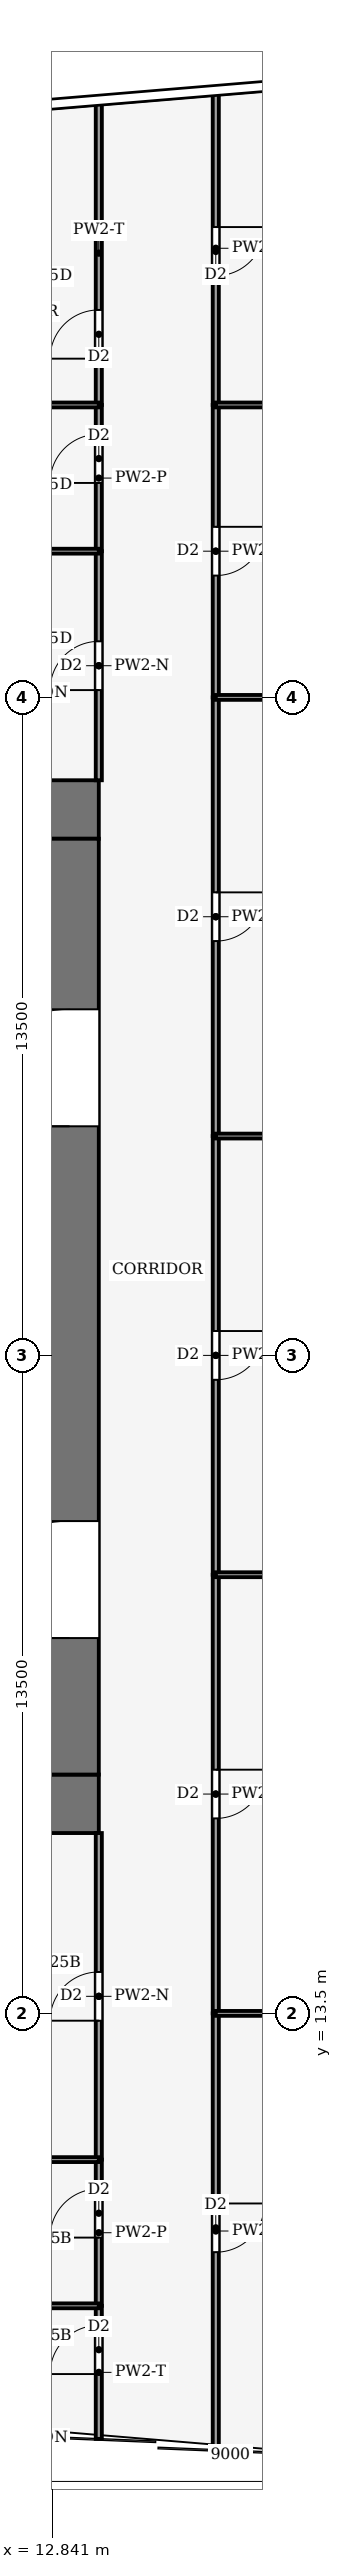
"""IFC4 building model, lengths in metres.
Left out: names, types, materials, properties, quantities, classifications, styles, units other than length and angle.
Written with IfcOpenShell. Run it as: python <this file> out.ifc"""

import sys

from ifc_helpers import new_model, si_unit, direction, frame, frame_2d, origin, place, context, subcontext, project, spatial, rectangle, extrude, element, fill, save


model = new_model("IFC4")
c1 = context("Model", 3, precision=1e-05, world=origin(), true_north=direction((0.0, 1.0)))
c2 = subcontext(c1, "Body", "Model", "MODEL_VIEW")
j1 = project(units=[si_unit("LENGTHUNIT", "METRE"), si_unit("PLANEANGLEUNIT", "RADIAN")], contexts=[c1])
p1 = place(None, origin())
s1 = spatial("IfcSite", under=j1, at=p1, CompositionType="ELEMENT")
p2 = place(p1, origin())
s2 = spatial("IfcBuilding", under=s1, at=p2, CompositionType="ELEMENT")
p3 = place(p2, frame((0.0, 0.0, 110.0)))
s3 = spatial("IfcBuildingStorey", under=s2, at=p3, CompositionType="ELEMENT", Elevation=110.0)
for number, where, z_axis, x_axis in (
    (1, (-13.8, 17.8, -0.13), (0.0, 0.0, 1.0), (1.0, 0.0, 0.0)),
    (2, (-13.8, 38.2, -0.13), (0.0, 0.0, 1.0), (1.0, 0.0, 0.0)),
):
    element("IfcWall", number, at=place(p3, frame(where, z_axis=z_axis, x_axis=x_axis)), inside=s3, PredefinedType="SHEAR", context=c2, shape_type="SweptSolid", body=[
        extrude(rectangle(XDim=27.6, YDim=1.2, at=frame_2d((13.8, 0.0))), origin(), (0.0, 0.0, 1.0), 3.88),
    ])
p4 = place(p3, frame((13.2, 18.4, -0.13), z_axis=(0.0, 0.0, 1.0), x_axis=(0.0, 1.0, 0.0)))
e3 = element("IfcWall", 3, at=p4, inside=s3, PredefinedType="SHEAR", context=c2, shape_type="SweptSolid", body=[
    extrude(rectangle(XDim=19.2, YDim=1.2, at=frame_2d((9.6, 0.0))), origin(), (0.0, 0.0, 1.0), 3.88),
])
p5 = place(p4, frame((2.8, 0.0, 0.13)))
e4 = element("IfcOpeningElement", 4, at=p5, cuts=e3, PredefinedType="OPENING", context=c2, shape_type="SweptSolid", body=[
    extrude(rectangle(XDim=2.4, YDim=2.4, at=frame_2d((1.2, 1.2))), frame((0.0, 0.61, 0.0), z_axis=(0.0, -1.0, 0.0), x_axis=(1.0, 0.0, 0.0)), (0.0, 0.0, 1.0), 1.22),
])
p6 = place(p4, frame((13.3, 0.0, 0.13)))
e5 = element("IfcOpeningElement", 5, at=p6, cuts=e3, PredefinedType="OPENING", context=c2, shape_type="SweptSolid", body=[
    extrude(rectangle(XDim=2.4, YDim=2.4, at=frame_2d((1.2, 1.2))), frame((0.0, 0.61, 0.0), z_axis=(0.0, -1.0, 0.0), x_axis=(1.0, 0.0, 0.0)), (0.0, 0.0, 1.0), 1.22),
])
p7 = place(p3, frame((16.2, 13.5, 0.0), z_axis=(0.0, 0.0, 1.0), x_axis=(0.0, -1.0, 0.0)))
e6 = element("IfcWall", 6, at=p7, inside=s3, PredefinedType="PARTITIONING", context=c2, shape_type="SweptSolid", body=[
    extrude(rectangle(XDim=8.93, YDim=0.125, at=frame_2d((4.465, 0.0))), origin(), (0.0, 0.0, 1.0), 2.92),
])
p8 = place(p7, frame((3.9, 0.0, 0.0)))
e7 = element("IfcOpeningElement", 7, at=p8, cuts=e6, PredefinedType="OPENING", context=c2, shape_type="SweptSolid", body=[
    extrude(rectangle(XDim=1.0, YDim=2.1, at=frame_2d((0.5, 1.05))), frame((0.0, 0.073, 0.0), z_axis=(0.0, -1.0, 0.0), x_axis=(1.0, 0.0, 0.0)), (0.0, 0.0, 1.0), 0.145),
])
p9 = place(p3, frame((16.2, 22.5, 0.0), z_axis=(0.0, 0.0, 1.0), x_axis=(0.0, -1.0, 0.0)))
e8 = element("IfcWall", 8, at=p9, inside=s3, PredefinedType="PARTITIONING", context=c2, shape_type="SweptSolid", body=[
    extrude(rectangle(XDim=9.0, YDim=0.125, at=frame_2d((4.5, 0.0))), origin(), (0.0, 0.0, 1.0), 3.02),
])
p10 = place(p9, frame((4.0, 0.0, 0.0)))
e9 = element("IfcOpeningElement", 9, at=p10, cuts=e8, PredefinedType="OPENING", context=c2, shape_type="SweptSolid", body=[
    extrude(rectangle(XDim=1.0, YDim=2.1, at=frame_2d((0.5, 1.05))), frame((0.0, 0.073, 0.0), z_axis=(0.0, -1.0, 0.0), x_axis=(1.0, 0.0, 0.0)), (0.0, 0.0, 1.0), 0.145),
])
p11 = place(p3, frame((16.2, 31.5, 0.0), z_axis=(0.0, 0.0, 1.0), x_axis=(0.0, -1.0, 0.0)))
e10 = element("IfcWall", 10, at=p11, inside=s3, PredefinedType="PARTITIONING", context=c2, shape_type="SweptSolid", body=[
    extrude(rectangle(XDim=9.0, YDim=0.125, at=frame_2d((4.5, 0.0))), origin(), (0.0, 0.0, 1.0), 3.36),
])
p12 = place(p11, frame((4.0, 0.0, 0.0)))
e11 = element("IfcOpeningElement", 11, at=p12, cuts=e10, PredefinedType="OPENING", context=c2, shape_type="SweptSolid", body=[
    extrude(rectangle(XDim=1.0, YDim=2.1, at=frame_2d((0.5, 1.05))), frame((0.0, 0.073, 0.0), z_axis=(0.0, -1.0, 0.0), x_axis=(1.0, 0.0, 0.0)), (0.0, 0.0, 1.0), 0.145),
])
p13 = place(p3, frame((16.2, 40.5, 0.0), z_axis=(0.0, 0.0, 1.0), x_axis=(0.0, -1.0, 0.0)))
e12 = element("IfcWall", 12, at=p13, inside=s3, PredefinedType="PARTITIONING", context=c2, shape_type="SweptSolid", body=[
    extrude(rectangle(XDim=9.0, YDim=0.125, at=frame_2d((4.5, 0.0))), origin(), (0.0, 0.0, 1.0), 3.02),
])
p14 = place(p13, frame((4.0, 0.0, 0.0)))
e13 = element("IfcOpeningElement", 13, at=p14, cuts=e12, PredefinedType="OPENING", context=c2, shape_type="SweptSolid", body=[
    extrude(rectangle(XDim=1.0, YDim=2.1, at=frame_2d((0.5, 1.05))), frame((0.0, 0.073, 0.0), z_axis=(0.0, -1.0, 0.0), x_axis=(1.0, 0.0, 0.0)), (0.0, 0.0, 1.0), 0.145),
])
p15 = place(p3, frame((16.2, 46.5, 0.0), z_axis=(0.0, 0.0, 1.0), x_axis=(0.0, -1.0, 0.0)))
e14 = element("IfcWall", 14, at=p15, inside=s3, PredefinedType="PARTITIONING", context=c2, shape_type="SweptSolid", body=[
    extrude(rectangle(XDim=6.0, YDim=0.125, at=frame_2d((3.0, 0.0))), origin(), (0.0, 0.0, 1.0), 3.75),
])
p16 = place(p15, frame((2.5, 0.0, 0.0)))
e15 = element("IfcOpeningElement", 15, at=p16, cuts=e14, PredefinedType="OPENING", context=c2, shape_type="SweptSolid", body=[
    extrude(rectangle(XDim=1.0, YDim=2.1, at=frame_2d((0.5, 1.05))), frame((0.0, 0.073, 0.0), z_axis=(0.0, -1.0, 0.0), x_axis=(1.0, 0.0, 0.0)), (0.0, 0.0, 1.0), 0.145),
])
p17 = place(p3, frame((16.2, 52.93, 0.0), z_axis=(0.0, 0.0, 1.0), x_axis=(0.0, -1.0, 0.0)))
e16 = element("IfcWall", 16, at=p17, inside=s3, PredefinedType="PARTITIONING", context=c2, shape_type="SweptSolid", body=[
    extrude(rectangle(XDim=6.43, YDim=0.125, at=frame_2d((3.215, 0.0))), origin(), (0.0, 0.0, 1.0), 2.92),
])
p18 = place(p17, frame((2.78, 0.0, 0.0)))
e17 = element("IfcOpeningElement", 17, at=p18, cuts=e16, PredefinedType="OPENING", context=c2, shape_type="SweptSolid", body=[
    extrude(rectangle(XDim=1.0, YDim=2.1, at=frame_2d((0.5, 1.05))), frame((0.0, 0.073, 0.0), z_axis=(0.0, -1.0, 0.0), x_axis=(1.0, 0.0, 0.0)), (0.0, 0.0, 1.0), 0.145),
])
p19 = place(p3, frame((13.8, 4.77, 0.0), z_axis=(0.0, 0.0, 1.0), x_axis=(0.0, 1.0, 0.0)))
e18 = element("IfcWall", 18, at=p19, inside=s3, PredefinedType="PARTITIONING", context=c2, shape_type="SweptSolid", body=[
    extrude(rectangle(XDim=2.73, YDim=0.125, at=frame_2d((1.365, 0.0))), origin(), (0.0, 0.0, 1.0), 2.92),
])
p20 = place(p19, frame((1.33, 0.0, 0.0)))
e19 = element("IfcOpeningElement", 19, at=p20, cuts=e18, PredefinedType="OPENING", context=c2, shape_type="SweptSolid", body=[
    extrude(rectangle(XDim=1.0, YDim=2.1, at=frame_2d((0.5, 1.05))), frame((0.0, 0.073, 0.0), z_axis=(0.0, -1.0, 0.0), x_axis=(1.0, 0.0, 0.0)), (0.0, 0.0, 1.0), 0.145),
])
p21 = place(p3, frame((13.8, 7.5, 0.0), z_axis=(0.0, 0.0, 1.0), x_axis=(0.0, 1.0, 0.0)))
e20 = element("IfcWall", 20, at=p21, inside=s3, PredefinedType="PARTITIONING", context=c2, shape_type="SweptSolid", body=[
    extrude(rectangle(XDim=3.0, YDim=0.125, at=frame_2d((1.5, 0.0))), origin(), (0.0, 0.0, 1.0), 3.75),
])
p22 = place(p21, frame((1.4, 0.0, 0.0)))
e21 = element("IfcOpeningElement", 21, at=p22, cuts=e20, PredefinedType="OPENING", context=c2, shape_type="SweptSolid", body=[
    extrude(rectangle(XDim=1.0, YDim=2.1, at=frame_2d((0.5, 1.05))), frame((0.0, 0.073, 0.0), z_axis=(0.0, -1.0, 0.0), x_axis=(1.0, 0.0, 0.0)), (0.0, 0.0, 1.0), 0.145),
])
p23 = place(p3, frame((13.8, 10.5, 0.0), z_axis=(0.0, 0.0, 1.0), x_axis=(0.0, 1.0, 0.0)))
e22 = element("IfcWall", 22, at=p23, inside=s3, PredefinedType="PARTITIONING", context=c2, shape_type="SweptSolid", body=[
    extrude(rectangle(XDim=6.7, YDim=0.125, at=frame_2d((3.35, 0.0))), origin(), (0.0, 0.0, 1.0), 3.02),
])
p24 = place(p23, frame((2.85, 0.0, 0.0)))
e23 = element("IfcOpeningElement", 23, at=p24, cuts=e22, PredefinedType="OPENING", context=c2, shape_type="SweptSolid", body=[
    extrude(rectangle(XDim=1.0, YDim=2.1, at=frame_2d((0.5, 1.05))), frame((0.0, 0.073, 0.0), z_axis=(0.0, -1.0, 0.0), x_axis=(1.0, 0.0, 0.0)), (0.0, 0.0, 1.0), 0.145),
])
p25 = place(p3, frame((13.8, 38.8, 0.0), z_axis=(0.0, 0.0, 1.0), x_axis=(0.0, 1.0, 0.0)))
e24 = element("IfcWall", 24, at=p25, inside=s3, PredefinedType="PARTITIONING", context=c2, shape_type="SweptSolid", body=[
    extrude(rectangle(XDim=4.7, YDim=0.125, at=frame_2d((2.35, 0.0))), origin(), (0.0, 0.0, 1.0), 3.02),
])
p26 = place(p25, frame((1.85, 0.0, 0.0)))
e25 = element("IfcOpeningElement", 25, at=p26, cuts=e24, PredefinedType="OPENING", context=c2, shape_type="SweptSolid", body=[
    extrude(rectangle(XDim=1.0, YDim=2.1, at=frame_2d((0.5, 1.05))), frame((0.0, 0.073, 0.0), z_axis=(0.0, -1.0, 0.0), x_axis=(1.0, 0.0, 0.0)), (0.0, 0.0, 1.0), 0.145),
])
p27 = place(p3, frame((13.8, 43.5, 0.0), z_axis=(0.0, 0.0, 1.0), x_axis=(0.0, 1.0, 0.0)))
e26 = element("IfcWall", 26, at=p27, inside=s3, PredefinedType="PARTITIONING", context=c2, shape_type="SweptSolid", body=[
    extrude(rectangle(XDim=3.0, YDim=0.125, at=frame_2d((1.5, 0.0))), origin(), (0.0, 0.0, 1.0), 3.75),
])
p28 = place(p27, frame((1.4, 0.0, 0.0)))
e27 = element("IfcOpeningElement", 27, at=p28, cuts=e26, PredefinedType="OPENING", context=c2, shape_type="SweptSolid", body=[
    extrude(rectangle(XDim=1.0, YDim=2.1, at=frame_2d((0.5, 1.05))), frame((0.0, 0.073, 0.0), z_axis=(0.0, -1.0, 0.0), x_axis=(1.0, 0.0, 0.0)), (0.0, 0.0, 1.0), 0.145),
])
p29 = place(p3, frame((13.8, 46.5, 0.0), z_axis=(0.0, 0.0, 1.0), x_axis=(0.0, 1.0, 0.0)))
e28 = element("IfcWall", 28, at=p29, inside=s3, PredefinedType="PARTITIONING", context=c2, shape_type="SweptSolid", body=[
    extrude(rectangle(XDim=6.23, YDim=0.125, at=frame_2d((3.115, 0.0))), origin(), (0.0, 0.0, 1.0), 2.92),
])
p30 = place(p29, frame((0.95, 0.0, 0.0)))
e29 = element("IfcOpeningElement", 29, at=p30, cuts=e28, PredefinedType="OPENING", context=c2, shape_type="SweptSolid", body=[
    extrude(rectangle(XDim=1.0, YDim=2.1, at=frame_2d((0.5, 1.05))), frame((0.0, 0.073, 0.0), z_axis=(0.0, -1.0, 0.0), x_axis=(1.0, 0.0, 0.0)), (0.0, 0.0, 1.0), 0.145),
])
p31 = place(p3, frame((23.833, 13.5, 0.0), z_axis=(0.0, 0.0, 1.0), x_axis=(-1.0, 0.0, 0.0)))
e30 = element("IfcWall", 30, at=p31, inside=s3, PredefinedType="PARTITIONING", context=c2, shape_type="SweptSolid", body=[
    extrude(rectangle(XDim=7.634, YDim=0.1, at=frame_2d((3.817, 0.0))), origin(), (0.0, 0.0, 1.0), 2.92),
])
p32 = place(p3, frame((23.094, 22.5, 0.0), z_axis=(0.0, 0.0, 1.0), x_axis=(-1.0, 0.0, 0.0)))
e31 = element("IfcWall", 31, at=p32, inside=s3, PredefinedType="PARTITIONING", context=c2, shape_type="SweptSolid", body=[
    extrude(rectangle(XDim=6.894, YDim=0.1, at=frame_2d((3.447, 0.0))), origin(), (0.0, 0.0, 1.0), 2.92),
])
p33 = place(p3, frame((22.806, 31.5, 0.0), z_axis=(0.0, 0.0, 1.0), x_axis=(-1.0, 0.0, 0.0)))
e32 = element("IfcWall", 32, at=p33, inside=s3, PredefinedType="PARTITIONING", context=c2, shape_type="SweptSolid", body=[
    extrude(rectangle(XDim=6.606, YDim=0.1, at=frame_2d((3.303, 0.0))), origin(), (0.0, 0.0, 1.0), 2.92),
])
p34 = place(p3, frame((23.546, 40.5, 0.0), z_axis=(0.0, 0.0, 1.0), x_axis=(-1.0, 0.0, 0.0)))
e33 = element("IfcWall", 33, at=p34, inside=s3, PredefinedType="PARTITIONING", context=c2, shape_type="SweptSolid", body=[
    extrude(rectangle(XDim=7.346, YDim=0.1, at=frame_2d((3.673, 0.0))), origin(), (0.0, 0.0, 1.0), 2.92),
])
p35 = place(p3, frame((24.039, 46.5, 0.0), z_axis=(0.0, 0.0, 1.0), x_axis=(-1.0, 0.0, 0.0)))
e34 = element("IfcWall", 34, at=p35, inside=s3, PredefinedType="PARTITIONING", context=c2, shape_type="SweptSolid", body=[
    extrude(rectangle(XDim=7.839, YDim=0.1, at=frame_2d((3.919, 0.0))), origin(), (0.0, 0.0, 1.0), 2.92),
])
for number, where, z_axis, x_axis in (
    (35, (13.8, 7.5, 0.0), (0.0, 0.0, 1.0), (-1.0, 0.0, 0.0)),
    (36, (13.8, 10.5, 0.0), (0.0, 0.0, 1.0), (-1.0, 0.0, 0.0)),
):
    element("IfcWall", number, at=place(p3, frame(where, z_axis=z_axis, x_axis=x_axis)), inside=s3, PredefinedType="PARTITIONING", context=c2, shape_type="SweptSolid", body=[
        extrude(rectangle(XDim=3.3, YDim=0.1, at=frame_2d((1.65, 0.0))), origin(), (0.0, 0.0, 1.0), 3.32),
    ])
for number, where, z_axis, x_axis in (
    (37, (13.8, 43.5, 0.0), (0.0, 0.0, 1.0), (-1.0, 0.0, 0.0)),
    (38, (13.8, 46.5, 0.0), (0.0, 0.0, 1.0), (-1.0, 0.0, 0.0)),
):
    element("IfcWall", number, at=place(p3, frame(where, z_axis=z_axis, x_axis=x_axis)), inside=s3, PredefinedType="PARTITIONING", context=c2, shape_type="SweptSolid", body=[
        extrude(rectangle(XDim=3.3, YDim=0.1, at=frame_2d((1.65, 0.0))), origin(), (0.0, 0.0, 1.0), 3.27),
    ])
p36 = place(p5, origin())
e39 = element("IfcDoor", 39, at=p36, inside=s3, OperationType="DOUBLE_DOOR_SINGLE_SWING", PredefinedType="DOOR", context=c2, shape_type="SweptSolid", body=[
    extrude(rectangle(XDim=2.4, YDim=2.4, at=frame_2d((1.2, 1.2))), frame((0.0, 0.025, 0.0), z_axis=(0.0, -1.0, 0.0), x_axis=(1.0, 0.0, 0.0)), (0.0, 0.0, 1.0), 0.05),
])
fill(e4, e39)
p37 = place(p6, origin())
e40 = element("IfcDoor", 40, at=p37, inside=s3, OperationType="DOUBLE_DOOR_SINGLE_SWING", PredefinedType="DOOR", context=c2, shape_type="SweptSolid", body=[
    extrude(rectangle(XDim=2.4, YDim=2.4, at=frame_2d((1.2, 1.2))), frame((0.0, 0.025, 0.0), z_axis=(0.0, -1.0, 0.0), x_axis=(1.0, 0.0, 0.0)), (0.0, 0.0, 1.0), 0.05),
])
fill(e5, e40)
p38 = place(p8, origin())
e41 = element("IfcDoor", 41, at=p38, inside=s3, OperationType="SINGLE_SWING_LEFT", PredefinedType="DOOR", context=c2, shape_type="SweptSolid", body=[
    extrude(rectangle(XDim=1.0, YDim=2.1, at=frame_2d((0.5, 1.05))), frame((0.0, 0.025, 0.0), z_axis=(0.0, -1.0, 0.0), x_axis=(1.0, 0.0, 0.0)), (0.0, 0.0, 1.0), 0.05),
])
fill(e7, e41)
p39 = place(p10, origin())
e42 = element("IfcDoor", 42, at=p39, inside=s3, OperationType="SINGLE_SWING_LEFT", PredefinedType="DOOR", context=c2, shape_type="SweptSolid", body=[
    extrude(rectangle(XDim=1.0, YDim=2.1, at=frame_2d((0.5, 1.05))), frame((0.0, 0.025, 0.0), z_axis=(0.0, -1.0, 0.0), x_axis=(1.0, 0.0, 0.0)), (0.0, 0.0, 1.0), 0.05),
])
fill(e9, e42)
p40 = place(p12, origin())
e43 = element("IfcDoor", 43, at=p40, inside=s3, OperationType="SINGLE_SWING_RIGHT", PredefinedType="DOOR", context=c2, shape_type="SweptSolid", body=[
    extrude(rectangle(XDim=1.0, YDim=2.1, at=frame_2d((0.5, 1.05))), frame((0.0, 0.025, 0.0), z_axis=(0.0, -1.0, 0.0), x_axis=(1.0, 0.0, 0.0)), (0.0, 0.0, 1.0), 0.05),
])
fill(e11, e43)
p41 = place(p14, origin())
e44 = element("IfcDoor", 44, at=p41, inside=s3, OperationType="SINGLE_SWING_LEFT", PredefinedType="DOOR", context=c2, shape_type="SweptSolid", body=[
    extrude(rectangle(XDim=1.0, YDim=2.1, at=frame_2d((0.5, 1.05))), frame((0.0, 0.025, 0.0), z_axis=(0.0, -1.0, 0.0), x_axis=(1.0, 0.0, 0.0)), (0.0, 0.0, 1.0), 0.05),
])
fill(e13, e44)
p42 = place(p16, origin())
e45 = element("IfcDoor", 45, at=p42, inside=s3, OperationType="SINGLE_SWING_RIGHT", PredefinedType="DOOR", context=c2, shape_type="SweptSolid", body=[
    extrude(rectangle(XDim=1.0, YDim=2.1, at=frame_2d((0.5, 1.05))), frame((0.0, 0.025, 0.0), z_axis=(0.0, -1.0, 0.0), x_axis=(1.0, 0.0, 0.0)), (0.0, 0.0, 1.0), 0.05),
])
fill(e15, e45)
p43 = place(p18, origin())
e46 = element("IfcDoor", 46, at=p43, inside=s3, OperationType="SINGLE_SWING_RIGHT", PredefinedType="DOOR", context=c2, shape_type="SweptSolid", body=[
    extrude(rectangle(XDim=1.0, YDim=2.1, at=frame_2d((0.5, 1.05))), frame((0.0, 0.025, 0.0), z_axis=(0.0, -1.0, 0.0), x_axis=(1.0, 0.0, 0.0)), (0.0, 0.0, 1.0), 0.05),
])
fill(e17, e46)
p44 = place(p20, origin())
e47 = element("IfcDoor", 47, at=p44, inside=s3, OperationType="SINGLE_SWING_RIGHT", PredefinedType="DOOR", context=c2, shape_type="SweptSolid", body=[
    extrude(rectangle(XDim=1.0, YDim=2.1, at=frame_2d((0.5, 1.05))), frame((0.0, 0.025, 0.0), z_axis=(0.0, -1.0, 0.0), x_axis=(1.0, 0.0, 0.0)), (0.0, 0.0, 1.0), 0.05),
])
fill(e19, e47)
p45 = place(p22, origin())
e48 = element("IfcDoor", 48, at=p45, inside=s3, OperationType="SINGLE_SWING_RIGHT", PredefinedType="DOOR", context=c2, shape_type="SweptSolid", body=[
    extrude(rectangle(XDim=1.0, YDim=2.1, at=frame_2d((0.5, 1.05))), frame((0.0, 0.025, 0.0), z_axis=(0.0, -1.0, 0.0), x_axis=(1.0, 0.0, 0.0)), (0.0, 0.0, 1.0), 0.05),
])
fill(e21, e48)
p46 = place(p24, origin())
e49 = element("IfcDoor", 49, at=p46, inside=s3, OperationType="SINGLE_SWING_RIGHT", PredefinedType="DOOR", context=c2, shape_type="SweptSolid", body=[
    extrude(rectangle(XDim=1.0, YDim=2.1, at=frame_2d((0.5, 1.05))), frame((0.0, 0.025, 0.0), z_axis=(0.0, -1.0, 0.0), x_axis=(1.0, 0.0, 0.0)), (0.0, 0.0, 1.0), 0.05),
])
fill(e23, e49)
p47 = place(p26, origin())
e50 = element("IfcDoor", 50, at=p47, inside=s3, OperationType="SINGLE_SWING_LEFT", PredefinedType="DOOR", context=c2, shape_type="SweptSolid", body=[
    extrude(rectangle(XDim=1.0, YDim=2.1, at=frame_2d((0.5, 1.05))), frame((0.0, 0.025, 0.0), z_axis=(0.0, -1.0, 0.0), x_axis=(1.0, 0.0, 0.0)), (0.0, 0.0, 1.0), 0.05),
])
fill(e25, e50)
p48 = place(p28, origin())
e51 = element("IfcDoor", 51, at=p48, inside=s3, OperationType="SINGLE_SWING_RIGHT", PredefinedType="DOOR", context=c2, shape_type="SweptSolid", body=[
    extrude(rectangle(XDim=1.0, YDim=2.1, at=frame_2d((0.5, 1.05))), frame((0.0, 0.025, 0.0), z_axis=(0.0, -1.0, 0.0), x_axis=(1.0, 0.0, 0.0)), (0.0, 0.0, 1.0), 0.05),
])
fill(e27, e51)
p49 = place(p30, origin())
e52 = element("IfcDoor", 52, at=p49, inside=s3, OperationType="SINGLE_SWING_LEFT", PredefinedType="DOOR", context=c2, shape_type="SweptSolid", body=[
    extrude(rectangle(XDim=1.0, YDim=2.1, at=frame_2d((0.5, 1.05))), frame((0.0, 0.025, 0.0), z_axis=(0.0, -1.0, 0.0), x_axis=(1.0, 0.0, 0.0)), (0.0, 0.0, 1.0), 0.05),
])
fill(e29, e52)
save(model, sys.argv[1])
